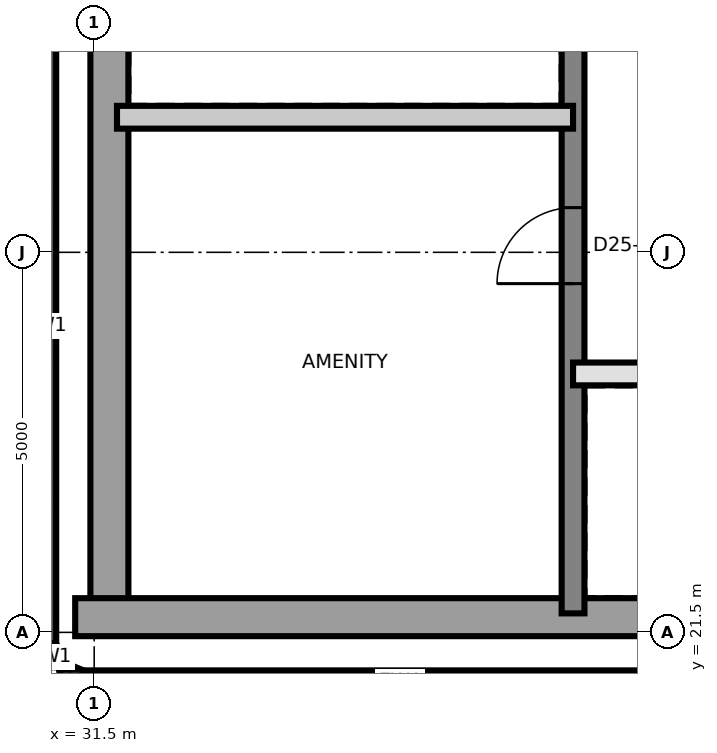
"""IFC4 building model, lengths in metres.
Left out: names, types, materials, properties, quantities, classifications, styles, units other than length and angle.
Written with IfcOpenShell. Run it as: python <this file> out.ifc"""

import sys

from ifc_helpers import new_model, si_unit, direction, frame, frame_2d, origin, place, context, subcontext, project, spatial, rectangle, extrude, element, fill, save


model = new_model("IFC4")
c1 = context("Model", 3, precision=1e-05, world=origin(), true_north=direction((0.0, 1.0)))
c2 = subcontext(c1, "Body", "Model", "MODEL_VIEW")
j1 = project(units=[si_unit("LENGTHUNIT", "METRE"), si_unit("PLANEANGLEUNIT", "RADIAN")], contexts=[c1])
p1 = place(None, origin())
s1 = spatial("IfcSite", under=j1, at=p1, CompositionType="ELEMENT")
p2 = place(p1, origin())
s2 = spatial("IfcBuilding", under=s1, at=p2, CompositionType="ELEMENT")
p3 = place(p2, frame((0.0, 0.0, 229.1)))
s3 = spatial("IfcBuildingStorey", under=s2, at=p3, CompositionType="ELEMENT", Elevation=229.1)
p4 = place(p3, frame((31.7, 21.75, 0.0), z_axis=(0.0, 0.0, 1.0), x_axis=(0.0, 1.0, 0.0)))
e1 = element("IfcWall", 1, at=p4, inside=s3, PredefinedType="SHEAR", context=c2, shape_type="SweptSolid", body=[
    extrude(rectangle(XDim=17.5, YDim=0.5, at=frame_2d((8.75, 0.0))), origin(), (0.0, 0.0, 1.0), 3.7),
])
p5 = place(p3, frame((31.25, 21.7, 0.0), z_axis=(0.0, 0.0, 1.0), x_axis=(1.0, 0.0, 0.0)))
e2 = element("IfcWall", 2, at=p5, inside=s3, PredefinedType="SHEAR", context=c2, shape_type="SweptSolid", body=[
    extrude(rectangle(XDim=27.0, YDim=0.5, at=frame_2d((13.5, 0.0))), origin(), (0.0, 0.0, 1.0), 3.7),
])
p6 = place(p3, frame((37.8, 21.75, 0.0), z_axis=(0.0, 0.0, 1.0), x_axis=(0.0, 1.0, 0.0)))
e3 = element("IfcWall", 3, at=p6, inside=s3, PredefinedType="SHEAR", context=c2, shape_type="SweptSolid", body=[
    extrude(rectangle(XDim=8.75, YDim=0.3, at=frame_2d((4.375, 0.0))), origin(), (0.0, 0.0, 1.0), 3.7),
])
p7 = place(p6, frame((4.338, 0.0, 0.0)))
e4 = element("IfcOpeningElement", 4, at=p7, cuts=e3, PredefinedType="OPENING", context=c2, shape_type="SweptSolid", body=[
    extrude(rectangle(XDim=1.0, YDim=2.1, at=frame_2d((0.5, 1.05))), frame((0.0, 0.16, 0.0), z_axis=(0.0, -1.0, 0.0), x_axis=(1.0, 0.0, 0.0)), (0.0, 0.0, 1.0), 0.32),
])
p8 = place(p3, frame((30.85, 29.699, 0.0), z_axis=(0.0, 0.0, 1.0), x_axis=(0.0, -1.0, 0.0)))
e5 = element("IfcWall", 5, at=p8, inside=s3, PredefinedType="SOLIDWALL", context=c2, shape_type="SweptSolid", body=[
    extrude(rectangle(XDim=8.34, YDim=0.3, at=frame_2d((4.17, 0.0))), origin(), (0.0, 0.0, 1.0), 3.4),
])
for number, where, z_axis, x_axis in (
    (6, (30.861, 21.302, 0.0), (0.0, 0.0, 1.0), (0.383, -0.924, 0.0)),
    (7, (31.048, 20.967, 0.0), (0.0, 0.0, 1.0), (0.924, -0.383, 0.0)),
):
    element("IfcWall", number, at=place(p3, frame(where, z_axis=z_axis, x_axis=x_axis)), inside=s3, PredefinedType="SOLIDWALL", context=c2, shape_type="SweptSolid", body=[
        extrude(rectangle(XDim=0.275, YDim=0.3, at=frame_2d((0.138, 0.0))), origin(), (0.0, 0.0, 1.0), 3.4),
    ])
p9 = place(p3, frame((31.36, 20.85, 0.0), z_axis=(0.0, 0.0, 1.0), x_axis=(1.0, 0.0, 0.0)))
e8 = element("IfcWall", 8, at=p9, inside=s3, PredefinedType="SOLIDWALL", context=c2, shape_type="SweptSolid", body=[
    extrude(rectangle(XDim=8.34, YDim=0.3, at=frame_2d((4.17, 0.0))), origin(), (0.0, 0.0, 1.0), 3.4),
])
p10 = place(p3, frame((37.8, 24.9, 0.0), z_axis=(0.0, 0.0, 1.0), x_axis=(1.0, 0.0, 0.0)))
e9 = element("IfcWall", 9, at=p10, inside=s3, PredefinedType="SOLIDWALL", context=c2, shape_type="SweptSolid", body=[
    extrude(rectangle(XDim=12.0, YDim=0.3, at=frame_2d((6.0, 0.0))), origin(), (0.0, 0.0, 1.0), 3.4),
])
p11 = place(p10, frame((1.05, 0.0, 0.0)))
e10 = element("IfcOpeningElement", 10, at=p11, cuts=e9, PredefinedType="OPENING", context=c2, shape_type="SweptSolid", body=[
    extrude(rectangle(XDim=0.9, YDim=2.1, at=frame_2d((0.45, 1.05))), frame((0.0, 0.16, 0.0), z_axis=(0.0, -1.0, 0.0), x_axis=(1.0, 0.0, 0.0)), (0.0, 0.0, 1.0), 0.32),
])
p12 = place(p10, frame((10.05, 0.0, 0.0)))
e11 = element("IfcOpeningElement", 11, at=p12, cuts=e9, PredefinedType="OPENING", context=c2, shape_type="SweptSolid", body=[
    extrude(rectangle(XDim=0.9, YDim=2.1, at=frame_2d((0.45, 1.05))), frame((0.0, 0.16, 0.0), z_axis=(0.0, -1.0, 0.0), x_axis=(1.0, 0.0, 0.0)), (0.0, 0.0, 1.0), 0.32),
])
p13 = place(p10, frame((3.95, 0.0, 0.0)))
e12 = element("IfcOpeningElement", 12, at=p13, cuts=e9, PredefinedType="OPENING", context=c2, shape_type="SweptSolid", body=[
    extrude(rectangle(XDim=1.1, YDim=2.4, at=frame_2d((0.55, 1.2))), frame((0.0, 0.16, 0.0), z_axis=(0.0, -1.0, 0.0), x_axis=(1.0, 0.0, 0.0)), (0.0, 0.0, 1.0), 0.32),
])
p14 = place(p10, frame((6.95, 0.0, 0.0)))
e13 = element("IfcOpeningElement", 13, at=p14, cuts=e9, PredefinedType="OPENING", context=c2, shape_type="SweptSolid", body=[
    extrude(rectangle(XDim=1.1, YDim=2.4, at=frame_2d((0.55, 1.2))), frame((0.0, 0.16, 0.0), z_axis=(0.0, -1.0, 0.0), x_axis=(1.0, 0.0, 0.0)), (0.0, 0.0, 1.0), 0.32),
])
p15 = place(p3, frame((31.8, 28.277, 0.0), z_axis=(0.0, 0.0, 1.0), x_axis=(1.0, 0.0, 0.0)))
e14 = element("IfcWall", 14, at=p15, inside=s3, PredefinedType="PARTITIONING", context=c2, shape_type="SweptSolid", body=[
    extrude(rectangle(XDim=6.0, YDim=0.3, at=frame_2d((3.0, 0.0))), origin(), (0.0, 0.0, 1.0), 3.4),
])
p16 = place(p7, origin())
e15 = element("IfcDoor", 15, at=p16, inside=s3, OperationType="SINGLE_SWING_RIGHT", PredefinedType="DOOR", context=c2, shape_type="SweptSolid", body=[
    extrude(rectangle(XDim=1.0, YDim=2.1, at=frame_2d((0.5, 1.05))), frame((0.0, 0.025, 0.0), z_axis=(0.0, -1.0, 0.0), x_axis=(1.0, 0.0, 0.0)), (0.0, 0.0, 1.0), 0.05),
])
fill(e4, e15)
save(model, sys.argv[1])
